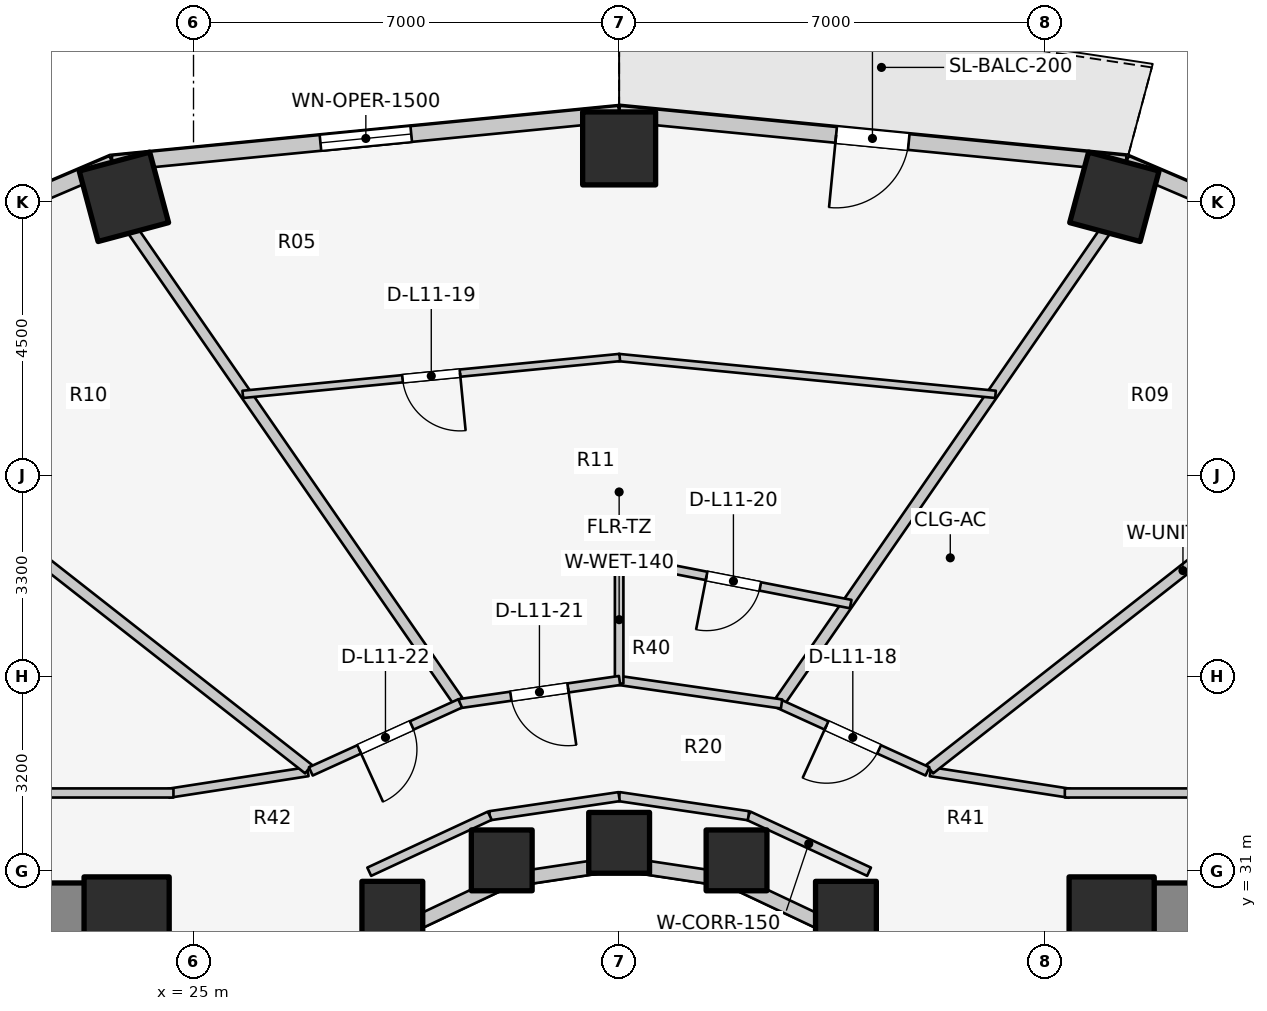
"""IFC4 building model, lengths in metres.
Left out: names, types, materials, properties, quantities, classifications, styles, units other than length and angle.
Written with IfcOpenShell. Run it as: python <this file> out.ifc"""

import sys

from ifc_helpers import new_model, si_unit, direction, frame, frame_2d, origin, origin_2d, place, context, subcontext, project, spatial, rectangle, extrude, element, fill, save


model = new_model("IFC4")
c1 = context("Model", 3, precision=1e-05, world=origin(), true_north=direction((0.0, 1.0)))
c2 = subcontext(c1, "Body", "Model", "MODEL_VIEW")
j1 = project(units=[si_unit("LENGTHUNIT", "METRE"), si_unit("PLANEANGLEUNIT", "RADIAN")], contexts=[c1])
p1 = place(None, origin())
s1 = spatial("IfcSite", under=j1, at=p1, CompositionType="ELEMENT")
p2 = place(p1, origin())
s2 = spatial("IfcBuilding", under=s1, at=p2, CompositionType="ELEMENT")
p3 = place(p2, frame((0.0, 0.0, 40.0)))
s3 = spatial("IfcBuildingStorey", under=s2, at=p3, CompositionType="ELEMENT", Elevation=40.0)
for number, where, z_axis, x_axis in (
    (1, (19.65, 30.35, 0.0), (0.0, 0.0, 1.0), (1.0, 0.0, 0.0)),
    (2, (39.85, 30.35, 0.0), (0.0, 0.0, 1.0), (1.0, 0.0, 0.0)),
):
    element("IfcWall", number, at=place(p3, frame(where, z_axis=z_axis, x_axis=x_axis)), inside=s3, PredefinedType="SHEAR", context=c2, shape_type="SweptSolid", body=[
        extrude(rectangle(XDim=4.5, YDim=0.9, at=frame_2d((2.25, 0.0))), origin(), (0.0, 0.0, 1.0), 3.1),
    ])
for number, where, z_axis, x_axis in (
    (3, (23.9, 30.2, 0.0), (0.0, 0.0, 1.0), (1.0, 0.0, 0.0)),
    (4, (40.1, 30.2, 0.0), (0.0, 0.0, 1.0), (1.0, 0.0, 0.0)),
):
    element("IfcColumn", number, at=place(p3, frame(where, z_axis=z_axis, x_axis=x_axis)), inside=s3, PredefinedType="COLUMN", context=c2, shape_type="SweptSolid", body=[
        extrude(rectangle(XDim=1.4, YDim=1.4, at=origin_2d()), origin(), (0.0, 0.0, 1.0), 3.1),
    ])
for number, where, z_axis, x_axis in (
    (5, (35.73, 30.327, 0.0), (0.0, 0.0, 1.0), (1.0, 0.0, 0.0)),
    (6, (33.931, 31.172, 0.0), (0.0, 0.0, 1.0), (1.0, 0.0, 0.0)),
):
    element("IfcColumn", number, at=place(p3, frame(where, z_axis=z_axis, x_axis=x_axis)), inside=s3, PredefinedType="COLUMN", context=c2, shape_type="SweptSolid", body=[
        extrude(rectangle(XDim=1.0, YDim=1.0, at=origin_2d()), origin(), (0.0, 0.0, 1.0), 3.1),
    ])
p4 = place(p3, frame((40.145, 42.084, 0.0), z_axis=(0.0, 0.0, 1.0), x_axis=(0.258819045103, 0.965925826289, 0.0)))
e7 = element("IfcColumn", 7, at=p4, inside=s3, PredefinedType="COLUMN", context=c2, shape_type="SweptSolid", body=[
    extrude(rectangle(XDim=1.2, YDim=1.2, at=origin_2d()), origin(), (0.0, 0.0, 1.0), 3.1),
])
p5 = place(p3, frame((32.0, 31.46, 0.0), z_axis=(0.0, 0.0, 1.0), x_axis=(1.0, 0.0, 0.0)))
e8 = element("IfcColumn", 8, at=p5, inside=s3, PredefinedType="COLUMN", context=c2, shape_type="SweptSolid", body=[
    extrude(rectangle(XDim=1.0, YDim=1.0, at=origin_2d()), origin(), (0.0, 0.0, 1.0), 3.1),
])
p6 = place(p3, frame((32.0, 42.88, 0.0), z_axis=(0.0, 0.0, 1.0), x_axis=(0.0, 1.0, 0.0)))
e9 = element("IfcColumn", 9, at=p6, inside=s3, PredefinedType="COLUMN", context=c2, shape_type="SweptSolid", body=[
    extrude(rectangle(XDim=1.2, YDim=1.2, at=origin_2d()), origin(), (0.0, 0.0, 1.0), 3.1),
])
p7 = place(p3, frame((30.069, 31.172, 0.0), z_axis=(0.0, 0.0, 1.0), x_axis=(1.0, 0.0, 0.0)))
e10 = element("IfcColumn", 10, at=p7, inside=s3, PredefinedType="COLUMN", context=c2, shape_type="SweptSolid", body=[
    extrude(rectangle(XDim=1.0, YDim=1.0, at=origin_2d()), origin(), (0.0, 0.0, 1.0), 3.1),
])
p8 = place(p3, frame((23.855, 42.084, 0.0), z_axis=(0.0, 0.0, 1.0), x_axis=(-0.258819045103, 0.965925826289, 0.0)))
e11 = element("IfcColumn", 11, at=p8, inside=s3, PredefinedType="COLUMN", context=c2, shape_type="SweptSolid", body=[
    extrude(rectangle(XDim=1.2, YDim=1.2, at=origin_2d()), origin(), (0.0, 0.0, 1.0), 3.1),
])
p9 = place(p3, frame((28.27, 30.327, 0.0), z_axis=(0.0, 0.0, 1.0), x_axis=(1.0, 0.0, 0.0)))
e12 = element("IfcColumn", 12, at=p9, inside=s3, PredefinedType="COLUMN", context=c2, shape_type="SweptSolid", body=[
    extrude(rectangle(XDim=1.0, YDim=1.0, at=origin_2d()), origin(), (0.0, 0.0, 1.0), 3.1),
])
p10 = place(p3, frame((37.035, 28.742, 0.0), z_axis=(0.0, 0.0, 1.0), x_axis=(-0.752576694707, 0.658504607869, 0.0)))
e13 = element("IfcWall", 13, at=p10, inside=s3, PredefinedType="STANDARD", context=c2, shape_type="SweptSolid", body=[
    extrude(rectangle(XDim=1.959, YDim=0.23, at=frame_2d((0.98, 0.0))), origin(), (0.0, 0.0, 1.0), 2.16),
])
p11 = place(p3, frame((35.56, 30.032, 0.0), z_axis=(0.0, 0.0, 1.0), x_axis=(-0.904179699603, 0.427152280606, 0.0)))
e14 = element("IfcWall", 14, at=p11, inside=s3, PredefinedType="STANDARD", context=c2, shape_type="SweptSolid", body=[
    extrude(rectangle(XDim=1.899, YDim=0.23, at=frame_2d((0.95, 0.0))), origin(), (0.0, 0.0, 1.0), 2.16),
])
for number, where, z_axis, x_axis in (
    (15, (33.843, 30.843, 0.0), (0.0, 0.0, 1.0), (-0.989, 0.149, 0.0)),
    (16, (32.0, 31.12, 0.0), (0.0, 0.0, 1.0), (-0.989, -0.149, 0.0)),
):
    element("IfcWall", number, at=place(p3, frame(where, z_axis=z_axis, x_axis=x_axis)), inside=s3, PredefinedType="STANDARD", context=c2, shape_type="SweptSolid", body=[
        extrude(rectangle(XDim=1.864, YDim=0.23, at=frame_2d((0.932, 0.0))), origin(), (0.0, 0.0, 1.0), 2.16),
    ])
p12 = place(p3, frame((30.157, 30.843, 0.0), z_axis=(0.0, 0.0, 1.0), x_axis=(-0.904179699603, -0.427152280606, 0.0)))
e17 = element("IfcWall", 17, at=p12, inside=s3, PredefinedType="STANDARD", context=c2, shape_type="SweptSolid", body=[
    extrude(rectangle(XDim=1.899, YDim=0.23, at=frame_2d((0.95, 0.0))), origin(), (0.0, 0.0, 1.0), 2.16),
])
p13 = place(p3, frame((28.44, 30.032, 0.0), z_axis=(0.0, 0.0, 1.0), x_axis=(-0.752576694707, -0.658504607869, 0.0)))
e18 = element("IfcWall", 18, at=p13, inside=s3, PredefinedType="STANDARD", context=c2, shape_type="SweptSolid", body=[
    extrude(rectangle(XDim=1.959, YDim=0.23, at=frame_2d((0.98, 0.0))), origin(), (0.0, 0.0, 1.0), 2.16),
])
p14 = place(p3, frame((46.042, 40.197, 0.0), z_axis=(0.0, 0.0, 1.0), x_axis=(-0.919612132394, 0.39282760335, 0.0)))
e19 = element("IfcWall", 19, at=p14, inside=s3, PredefinedType="STANDARD", context=c2, shape_type="SweptSolid", body=[
    extrude(rectangle(XDim=6.209, YDim=0.26, at=frame_2d((3.105, 0.0))), origin(), (0.0, 0.0, 1.0), 2.85),
])
p15 = place(p14, frame((1.905, 0.0, 0.75)))
e20 = element("IfcOpeningElement", 20, at=p15, cuts=e19, PredefinedType="OPENING", context=c2, shape_type="SweptSolid", body=[
    extrude(rectangle(XDim=2.4, YDim=1.7, at=frame_2d((1.2, 0.85))), frame((0.0, 0.14, 0.0), z_axis=(0.0, -1.0, 0.0), x_axis=(1.0, 0.0, 0.0)), (0.0, 0.0, 1.0), 0.28),
])
p16 = place(p3, frame((40.332, 42.636, 0.0), z_axis=(0.0, 0.0, 1.0), x_axis=(-0.995247718352, 0.097375454379, 0.0)))
e21 = element("IfcWall", 21, at=p16, inside=s3, PredefinedType="STANDARD", context=c2, shape_type="SweptSolid", body=[
    extrude(rectangle(XDim=8.372, YDim=0.26, at=frame_2d((4.186, 0.0))), origin(), (0.0, 0.0, 1.0), 2.88),
])
p17 = place(p16, frame((3.586, 0.0, 0.0)))
e22 = element("IfcOpeningElement", 22, at=p17, cuts=e21, PredefinedType="OPENING", context=c2, shape_type="SweptSolid", body=[
    extrude(rectangle(XDim=1.2, YDim=2.2, at=frame_2d((0.6, 1.1))), frame((0.0, 0.14, 0.0), z_axis=(0.0, -1.0, 0.0), x_axis=(1.0, 0.0, 0.0)), (0.0, 0.0, 1.0), 0.28),
])
p18 = place(p3, frame((32.0, 43.451, 0.0), z_axis=(0.0, 0.0, 1.0), x_axis=(-0.995247718352, -0.097375454379, 0.0)))
e23 = element("IfcWall", 23, at=p18, inside=s3, PredefinedType="STANDARD", context=c2, shape_type="SweptSolid", body=[
    extrude(rectangle(XDim=8.372, YDim=0.26, at=frame_2d((4.186, 0.0))), origin(), (0.0, 0.0, 1.0), 2.85),
])
p19 = place(p18, frame((3.436, 0.0, 0.75)))
e24 = element("IfcOpeningElement", 24, at=p19, cuts=e23, PredefinedType="OPENING", context=c2, shape_type="SweptSolid", body=[
    extrude(rectangle(XDim=1.5, YDim=1.6, at=frame_2d((0.75, 0.8))), frame((0.0, 0.14, 0.0), z_axis=(0.0, -1.0, 0.0), x_axis=(1.0, 0.0, 0.0)), (0.0, 0.0, 1.0), 0.28),
])
p20 = place(p3, frame((23.668, 42.636, 0.0), z_axis=(0.0, 0.0, 1.0), x_axis=(-0.919612132394, -0.39282760335, 0.0)))
e25 = element("IfcWall", 25, at=p20, inside=s3, PredefinedType="STANDARD", context=c2, shape_type="SweptSolid", body=[
    extrude(rectangle(XDim=6.209, YDim=0.26, at=frame_2d((3.105, 0.0))), origin(), (0.0, 0.0, 1.0), 2.85),
])
p21 = place(p20, frame((1.905, 0.0, 0.75)))
e26 = element("IfcOpeningElement", 26, at=p21, cuts=e25, PredefinedType="OPENING", context=c2, shape_type="SweptSolid", body=[
    extrude(rectangle(XDim=2.4, YDim=1.7, at=frame_2d((1.2, 0.85))), frame((0.0, 0.14, 0.0), z_axis=(0.0, -1.0, 0.0), x_axis=(1.0, 0.0, 0.0)), (0.0, 0.0, 1.0), 0.28),
])
p22 = place(p3, frame((36.11, 30.985, 0.0), z_axis=(0.0, 0.0, 1.0), x_axis=(-0.906943449489, 0.421252393975, 0.0)))
e27 = element("IfcWall", 27, at=p22, inside=s3, PredefinedType="PARTITIONING", context=c2, shape_type="SweptSolid", body=[
    extrude(rectangle(XDim=2.186, YDim=0.15, at=frame_2d((1.093, 0.0))), origin(), (0.0, 0.0, 1.0), 2.237),
])
for number, where, z_axis, x_axis in (
    (28, (34.127, 31.906, 0.0), (0.0, 0.0, 1.0), (-0.989, 0.146, 0.0)),
    (29, (32.0, 32.22, 0.0), (0.0, 0.0, 1.0), (-0.989, -0.146, 0.0)),
):
    element("IfcWall", number, at=place(p3, frame(where, z_axis=z_axis, x_axis=x_axis)), inside=s3, PredefinedType="PARTITIONING", context=c2, shape_type="SweptSolid", body=[
        extrude(rectangle(XDim=2.151, YDim=0.15, at=frame_2d((1.075, 0.0))), origin(), (0.0, 0.0, 1.0), 2.237),
    ])
p23 = place(p3, frame((29.873, 31.906, 0.0), z_axis=(0.0, 0.0, 1.0), x_axis=(-0.906943449489, -0.421252393975, 0.0)))
e30 = element("IfcWall", 30, at=p23, inside=s3, PredefinedType="PARTITIONING", context=c2, shape_type="SweptSolid", body=[
    extrude(rectangle(XDim=2.186, YDim=0.15, at=frame_2d((1.093, 0.0))), origin(), (0.0, 0.0, 1.0), 2.237),
])
p24 = place(p3, frame((37.119, 32.631, 0.0), z_axis=(0.0, 0.0, 1.0), x_axis=(0.988184633586, -0.153268163508, 0.0)))
e31 = element("IfcWall", 31, at=p24, inside=s3, PredefinedType="PARTITIONING", context=c2, shape_type="SweptSolid", body=[
    extrude(rectangle(XDim=2.318, YDim=0.15, at=frame_2d((1.159, 0.0))), origin(), (0.0, 0.0, 1.0), 2.237),
])
p25 = place(p3, frame((39.33, 32.28, 0.0), z_axis=(0.0, 0.0, 1.0), x_axis=(1.0, 0.0, 0.0)))
e32 = element("IfcWall", 32, at=p25, inside=s3, PredefinedType="PARTITIONING", context=c2, shape_type="SweptSolid", body=[
    extrude(rectangle(XDim=7.52, YDim=0.15, at=frame_2d((3.76, 0.0))), origin(), (0.0, 0.0, 1.0), 2.237),
])
p26 = place(p25, frame((5.22, 0.0, 0.0)))
e33 = element("IfcOpeningElement", 33, at=p26, cuts=e32, PredefinedType="OPENING", context=c2, shape_type="SweptSolid", body=[
    extrude(rectangle(XDim=0.9, YDim=2.1, at=frame_2d((0.45, 1.05))), frame((0.0, 0.085, 0.0), z_axis=(0.0, -1.0, 0.0), x_axis=(1.0, 0.0, 0.0)), (0.0, 0.0, 1.0), 0.17),
])
p27 = place(p3, frame((26.881, 32.631, 0.0), z_axis=(0.0, 0.0, 1.0), x_axis=(-0.988184633586, -0.153268163508, 0.0)))
e34 = element("IfcWall", 34, at=p27, inside=s3, PredefinedType="PARTITIONING", context=c2, shape_type="SweptSolid", body=[
    extrude(rectangle(XDim=2.318, YDim=0.15, at=frame_2d((1.159, 0.0))), origin(), (0.0, 0.0, 1.0), 2.237),
])
p28 = place(p3, frame((17.15, 32.28, 0.0), z_axis=(0.0, 0.0, 1.0), x_axis=(1.0, 0.0, 0.0)))
e35 = element("IfcWall", 35, at=p28, inside=s3, PredefinedType="PARTITIONING", context=c2, shape_type="SweptSolid", body=[
    extrude(rectangle(XDim=7.52, YDim=0.15, at=frame_2d((3.76, 0.0))), origin(), (0.0, 0.0, 1.0), 2.237),
])
p29 = place(p28, frame((1.3, 0.0, 0.0)))
e36 = element("IfcOpeningElement", 36, at=p29, cuts=e35, PredefinedType="OPENING", context=c2, shape_type="SweptSolid", body=[
    extrude(rectangle(XDim=0.9, YDim=2.1, at=frame_2d((0.45, 1.05))), frame((0.0, 0.085, 0.0), z_axis=(0.0, -1.0, 0.0), x_axis=(1.0, 0.0, 0.0)), (0.0, 0.0, 1.0), 0.17),
])
p30 = place(p3, frame((37.108, 32.673, 0.0), z_axis=(0.0, 0.0, 1.0), x_axis=(0.78700868866, 0.616941912966, 0.0)))
e37 = element("IfcWall", 37, at=p30, inside=s3, PredefinedType="PARTITIONING", context=c2, shape_type="SweptSolid", body=[
    extrude(rectangle(XDim=10.583, YDim=0.18, at=frame_2d((5.292, 0.0))), origin(), (0.0, 0.0, 1.0), 2.237),
])
for number, where, z_axis, x_axis in (
    (38, (34.653, 33.796, 0.0), (0.0, 0.0, 1.0), (0.569, 0.823, 0.0)),
    (39, (29.347, 33.796, 0.0), (0.0, 0.0, 1.0), (-0.569, 0.823, 0.0)),
):
    element("IfcWall", number, at=place(p3, frame(where, z_axis=z_axis, x_axis=x_axis)), inside=s3, PredefinedType="PARTITIONING", context=c2, shape_type="SweptSolid", body=[
        extrude(rectangle(XDim=9.394, YDim=0.18, at=frame_2d((4.697, 0.0))), origin(), (0.0, 0.0, 1.0), 2.237),
    ])
p31 = place(p3, frame((26.892, 32.673, 0.0), z_axis=(0.0, 0.0, 1.0), x_axis=(-0.78700868866, 0.616941912966, 0.0)))
e40 = element("IfcWall", 40, at=p31, inside=s3, PredefinedType="PARTITIONING", context=c2, shape_type="SweptSolid", body=[
    extrude(rectangle(XDim=10.583, YDim=0.18, at=frame_2d((5.292, 0.0))), origin(), (0.0, 0.0, 1.0), 2.237),
])
p32 = place(p3, frame((37.071, 32.635, 0.0), z_axis=(0.0, 0.0, 1.0), x_axis=(-0.910186679378, 0.414198272186, 0.0)))
e41 = element("IfcWall", 41, at=p32, inside=s3, PredefinedType="PARTITIONING", context=c2, shape_type="SweptSolid", body=[
    extrude(rectangle(XDim=2.698, YDim=0.15, at=frame_2d((1.349, 0.0))), origin(), (0.0, 0.0, 1.0), 2.237),
])
p33 = place(p32, frame((0.874, 0.0, 0.0)))
e42 = element("IfcOpeningElement", 42, at=p33, cuts=e41, PredefinedType="OPENING", context=c2, shape_type="SweptSolid", body=[
    extrude(rectangle(XDim=0.95, YDim=2.1, at=frame_2d((0.475, 1.05))), frame((0.0, 0.085, 0.0), z_axis=(0.0, -1.0, 0.0), x_axis=(1.0, 0.0, 0.0)), (0.0, 0.0, 1.0), 0.17),
])
p34 = place(p3, frame((38.19, 38.835, 0.0), z_axis=(0.0, 0.0, 1.0), x_axis=(-0.995257435484, 0.097276087063, 0.0)))
e43 = element("IfcWall", 43, at=p34, inside=s3, PredefinedType="MOVABLE", context=c2, shape_type="SweptSolid", body=[
    extrude(rectangle(XDim=6.229, YDim=0.12, at=frame_2d((3.115, 0.0))), origin(), (0.0, 0.0, 1.0), 2.237),
])
p35 = place(p3, frame((32.01, 39.441, 0.0), z_axis=(0.0, 0.0, 1.0), x_axis=(-0.995257435484, -0.097276087063, 0.0)))
e44 = element("IfcWall", 44, at=p35, inside=s3, PredefinedType="MOVABLE", context=c2, shape_type="SweptSolid", body=[
    extrude(rectangle(XDim=6.229, YDim=0.12, at=frame_2d((3.115, 0.0))), origin(), (0.0, 0.0, 1.0), 2.237),
])
p36 = place(p35, frame((2.64, 0.0, 0.0)))
e45 = element("IfcOpeningElement", 45, at=p36, cuts=e44, PredefinedType="OPENING", context=c2, shape_type="SweptSolid", body=[
    extrude(rectangle(XDim=0.95, YDim=2.1, at=frame_2d((0.475, 1.05))), frame((0.0, 0.07, 0.0), z_axis=(0.0, -1.0, 0.0), x_axis=(1.0, 0.0, 0.0)), (0.0, 0.0, 1.0), 0.14),
])
p37 = place(p3, frame((34.671, 33.744, 0.0), z_axis=(0.0, 0.0, 1.0), x_axis=(-0.989701115085, 0.143149232617, 0.0)))
e46 = element("IfcWall", 46, at=p37, inside=s3, PredefinedType="PARTITIONING", context=c2, shape_type="SweptSolid", body=[
    extrude(rectangle(XDim=2.749, YDim=0.15, at=frame_2d((1.375, 0.0))), origin(), (0.0, 0.0, 1.0), 2.237),
])
p38 = place(p3, frame((32.0, 34.08, 0.0), z_axis=(0.0, 0.0, 1.0), x_axis=(0.0, 1.0, 0.0)))
e47 = element("IfcWall", 47, at=p38, inside=s3, PredefinedType="PLUMBINGWALL", context=c2, shape_type="SweptSolid", body=[
    extrude(rectangle(XDim=2.1, YDim=0.14, at=frame_2d((1.05, 0.0))), origin(), (0.0, 0.0, 1.0), 2.237),
])
p39 = place(p3, frame((35.808, 35.386, 0.0), z_axis=(0.0, 0.0, 1.0), x_axis=(-0.981464096276, 0.191646100197, 0.0)))
e48 = element("IfcWall", 48, at=p39, inside=s3, PredefinedType="PLUMBINGWALL", context=c2, shape_type="SweptSolid", body=[
    extrude(rectangle(XDim=3.93, YDim=0.14, at=frame_2d((1.965, 0.0))), origin(), (0.0, 0.0, 1.0), 2.237),
])
p40 = place(p39, frame((1.515, 0.0, 0.0)))
e49 = element("IfcOpeningElement", 49, at=p40, cuts=e48, PredefinedType="OPENING", context=c2, shape_type="SweptSolid", body=[
    extrude(rectangle(XDim=0.9, YDim=2.1, at=frame_2d((0.45, 1.05))), frame((0.0, 0.08, 0.0), z_axis=(0.0, -1.0, 0.0), x_axis=(1.0, 0.0, 0.0)), (0.0, 0.0, 1.0), 0.16),
])
p41 = place(p3, frame((32.007, 34.13, 0.0), z_axis=(0.0, 0.0, 1.0), x_axis=(-0.989707881179, -0.143102445584, 0.0)))
e50 = element("IfcWall", 50, at=p41, inside=s3, PredefinedType="PARTITIONING", context=c2, shape_type="SweptSolid", body=[
    extrude(rectangle(XDim=2.663, YDim=0.15, at=frame_2d((1.332, 0.0))), origin(), (0.0, 0.0, 1.0), 2.237),
])
p42 = place(p41, frame((0.857, 0.0, 0.0)))
e51 = element("IfcOpeningElement", 51, at=p42, cuts=e50, PredefinedType="OPENING", context=c2, shape_type="SweptSolid", body=[
    extrude(rectangle(XDim=0.95, YDim=2.1, at=frame_2d((0.475, 1.05))), frame((0.0, 0.085, 0.0), z_axis=(0.0, -1.0, 0.0), x_axis=(1.0, 0.0, 0.0)), (0.0, 0.0, 1.0), 0.17),
])
p43 = place(p3, frame((29.385, 33.753, 0.0), z_axis=(0.0, 0.0, 1.0), x_axis=(-0.910186679378, -0.414198272186, 0.0)))
e52 = element("IfcWall", 52, at=p43, inside=s3, PredefinedType="PARTITIONING", context=c2, shape_type="SweptSolid", body=[
    extrude(rectangle(XDim=2.698, YDim=0.15, at=frame_2d((1.349, 0.0))), origin(), (0.0, 0.0, 1.0), 2.237),
])
p44 = place(p43, frame((0.874, 0.0, 0.0)))
e53 = element("IfcOpeningElement", 53, at=p44, cuts=e52, PredefinedType="OPENING", context=c2, shape_type="SweptSolid", body=[
    extrude(rectangle(XDim=0.95, YDim=2.1, at=frame_2d((0.475, 1.05))), frame((0.0, 0.085, 0.0), z_axis=(0.0, -1.0, 0.0), x_axis=(1.0, 0.0, 0.0)), (0.0, 0.0, 1.0), 0.17),
])
p45 = place(p17, origin())
e54 = element("IfcDoor", 54, at=p45, inside=s3, OperationType="SINGLE_SWING_RIGHT", PredefinedType="DOOR", context=c2, shape_type="SweptSolid", body=[
    extrude(rectangle(XDim=1.2, YDim=2.2, at=frame_2d((0.6, 1.1))), frame((0.0, 0.025, 0.0), z_axis=(0.0, -1.0, 0.0), x_axis=(1.0, 0.0, 0.0)), (0.0, 0.0, 1.0), 0.05),
])
fill(e22, e54)
p46 = place(p19, origin())
e55 = element("IfcWindow", 55, at=p46, inside=s3, PartitioningType="SINGLE_PANEL", PredefinedType="WINDOW", context=c2, shape_type="SweptSolid", body=[
    extrude(rectangle(XDim=1.5, YDim=1.6, at=frame_2d((0.75, 0.8))), frame((0.0, 0.03, 0.0), z_axis=(0.0, -1.0, 0.0), x_axis=(1.0, 0.0, 0.0)), (0.0, 0.0, 1.0), 0.06),
])
fill(e24, e55)
p47 = place(p33, origin())
e56 = element("IfcDoor", 56, at=p47, inside=s3, OperationType="SINGLE_SWING_RIGHT", PredefinedType="DOOR", context=c2, shape_type="SweptSolid", body=[
    extrude(rectangle(XDim=0.95, YDim=2.1, at=frame_2d((0.475, 1.05))), frame((0.0, 0.025, 0.0), z_axis=(0.0, -1.0, 0.0), x_axis=(1.0, 0.0, 0.0)), (0.0, 0.0, 1.0), 0.05),
])
fill(e42, e56)
p48 = place(p36, origin())
e57 = element("IfcDoor", 57, at=p48, inside=s3, OperationType="SINGLE_SWING_LEFT", PredefinedType="DOOR", context=c2, shape_type="SweptSolid", body=[
    extrude(rectangle(XDim=0.95, YDim=2.1, at=frame_2d((0.475, 1.05))), frame((0.0, 0.025, 0.0), z_axis=(0.0, -1.0, 0.0), x_axis=(1.0, 0.0, 0.0)), (0.0, 0.0, 1.0), 0.05),
])
fill(e45, e57)
p49 = place(p40, origin())
e58 = element("IfcDoor", 58, at=p49, inside=s3, OperationType="SINGLE_SWING_RIGHT", PredefinedType="DOOR", context=c2, shape_type="SweptSolid", body=[
    extrude(rectangle(XDim=0.9, YDim=2.1, at=frame_2d((0.45, 1.05))), frame((0.0, 0.025, 0.0), z_axis=(0.0, -1.0, 0.0), x_axis=(1.0, 0.0, 0.0)), (0.0, 0.0, 1.0), 0.05),
])
fill(e49, e58)
p50 = place(p42, origin())
e59 = element("IfcDoor", 59, at=p50, inside=s3, OperationType="SINGLE_SWING_LEFT", PredefinedType="DOOR", context=c2, shape_type="SweptSolid", body=[
    extrude(rectangle(XDim=0.95, YDim=2.1, at=frame_2d((0.475, 1.05))), frame((0.0, 0.025, 0.0), z_axis=(0.0, -1.0, 0.0), x_axis=(1.0, 0.0, 0.0)), (0.0, 0.0, 1.0), 0.05),
])
fill(e51, e59)
p51 = place(p44, origin())
e60 = element("IfcDoor", 60, at=p51, inside=s3, OperationType="SINGLE_SWING_RIGHT", PredefinedType="DOOR", context=c2, shape_type="SweptSolid", body=[
    extrude(rectangle(XDim=0.95, YDim=2.1, at=frame_2d((0.475, 1.05))), frame((0.0, 0.025, 0.0), z_axis=(0.0, -1.0, 0.0), x_axis=(1.0, 0.0, 0.0)), (0.0, 0.0, 1.0), 0.05),
])
fill(e53, e60)
save(model, sys.argv[1])
